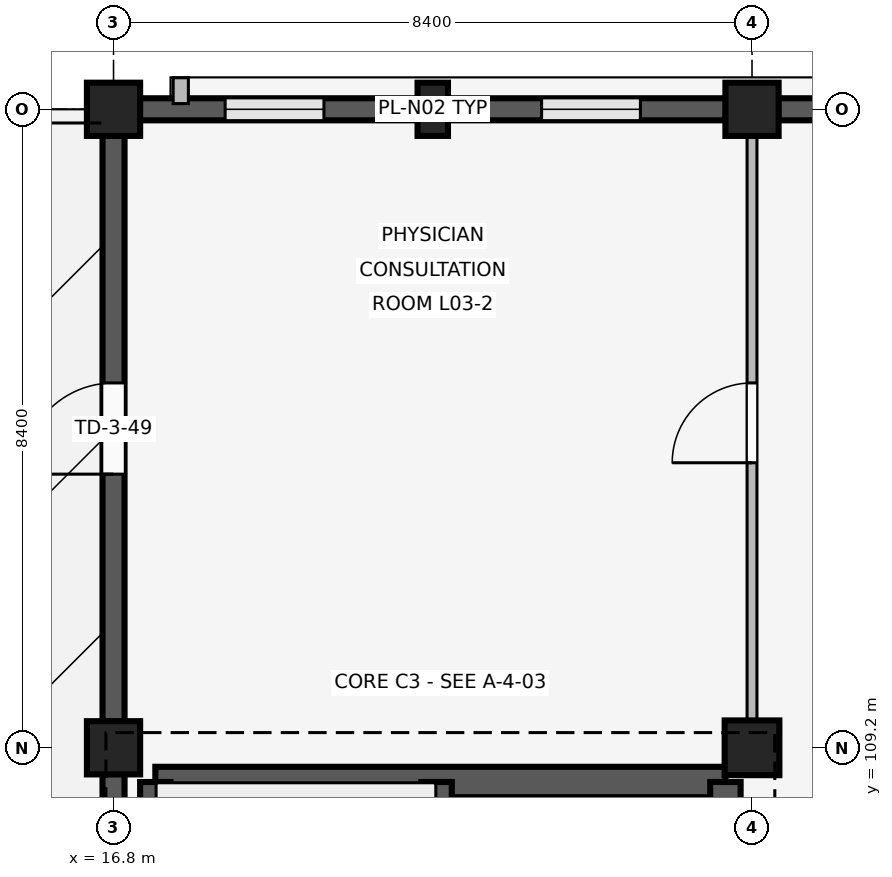
"""IFC4 building model, lengths in metres.
Left out: names, types, materials, properties, quantities, classifications, styles, units other than length and angle.
Written with IfcOpenShell. Run it as: python <this file> out.ifc"""

import sys

from ifc_helpers import new_model, si_unit, direction, frame, frame_2d, origin, origin_2d, place, context, subcontext, project, spatial, rectangle, extrude, element, fill, save


model = new_model("IFC4")
c1 = context("Model", 3, precision=1e-05, world=origin(), true_north=direction((0.0, 1.0)))
c2 = subcontext(c1, "Body", "Model", "MODEL_VIEW")
j1 = project(units=[si_unit("LENGTHUNIT", "METRE"), si_unit("PLANEANGLEUNIT", "RADIAN")], contexts=[c1])
p1 = place(None, origin())
s1 = spatial("IfcSite", under=j1, at=p1, CompositionType="ELEMENT")
p2 = place(p1, origin())
s2 = spatial("IfcBuilding", under=s1, at=p2, CompositionType="ELEMENT")
p3 = place(p2, frame((0.0, 0.0, 12.9)))
s3 = spatial("IfcBuildingStorey", under=s2, at=p3, CompositionType="ELEMENT", Elevation=12.9)
for number, where, z_axis, x_axis in (
    (1, (16.8, 109.2, 0.0), (0.0, 0.0, 1.0), (1.0, 0.0, 0.0)),
    (2, (16.8, 117.6, 0.0), (0.0, 0.0, 1.0), (1.0, 0.0, 0.0)),
):
    element("IfcColumn", number, at=place(p3, frame(where, z_axis=z_axis, x_axis=x_axis)), inside=s3, PredefinedType="COLUMN", context=c2, shape_type="SweptSolid", body=[
        extrude(rectangle(XDim=0.7, YDim=0.7, at=origin_2d()), origin(), (0.0, 0.0, 1.0), 3.3),
    ])
p4 = place(p3, frame((25.2, 109.2, 0.0), z_axis=(0.0, 0.0, 1.0), x_axis=(1.0, 0.0, 0.0)))
e3 = element("IfcColumn", 3, at=p4, inside=s3, PredefinedType="COLUMN", context=c2, shape_type="SweptSolid", body=[
    extrude(rectangle(XDim=0.72, YDim=0.72, at=origin_2d()), origin(), (0.0, 0.0, 1.0), 3.3),
])
p5 = place(p3, frame((25.2, 117.6, 0.0), z_axis=(0.0, 0.0, 1.0), x_axis=(1.0, 0.0, 0.0)))
e4 = element("IfcColumn", 4, at=p5, inside=s3, PredefinedType="COLUMN", context=c2, shape_type="SweptSolid", body=[
    extrude(rectangle(XDim=0.7, YDim=0.7, at=origin_2d()), origin(), (0.0, 0.0, 1.0), 3.3),
])
p6 = place(p3, frame((21.0, 117.6, 0.0), z_axis=(0.0, 0.0, 1.0), x_axis=(1.0, 0.0, 0.0)))
e5 = element("IfcColumn", 5, at=p6, inside=s3, PredefinedType="PILASTER", context=c2, shape_type="SweptSolid", body=[
    extrude(rectangle(XDim=0.4, YDim=0.7, at=origin_2d()), origin(), (0.0, 0.0, 1.0), 3.3),
])
p7 = place(p3, frame((16.8, 101.145, 0.0), z_axis=(0.0, 0.0, 1.0), x_axis=(0.0, 1.0, 0.0)))
e6 = element("IfcWall", 6, at=p7, inside=s3, PredefinedType="SOLIDWALL", context=c2, shape_type="SweptSolid", body=[
    extrude(rectangle(XDim=7.71, YDim=0.29, at=frame_2d((3.855, 0.0))), origin(), (0.0, 0.0, 1.0), 2.44),
])
p8 = place(p7, frame((1.1, 0.0, 1.05)))
e7 = element("IfcOpeningElement", 7, at=p8, cuts=e6, PredefinedType="OPENING", context=c2, shape_type="SweptSolid", body=[
    extrude(rectangle(XDim=1.5, YDim=0.75, at=frame_2d((0.75, 0.375))), frame((0.0, 0.155, 0.0), z_axis=(0.0, -1.0, 0.0), x_axis=(1.0, 0.0, 0.0)), (0.0, 0.0, 1.0), 0.31),
])
p9 = place(p7, frame((5.11, 0.0, 1.05)))
e8 = element("IfcOpeningElement", 8, at=p9, cuts=e6, PredefinedType="OPENING", context=c2, shape_type="SweptSolid", body=[
    extrude(rectangle(XDim=1.5, YDim=0.75, at=frame_2d((0.75, 0.375))), frame((0.0, 0.155, 0.0), z_axis=(0.0, -1.0, 0.0), x_axis=(1.0, 0.0, 0.0)), (0.0, 0.0, 1.0), 0.31),
])
p10 = place(p3, frame((17.145, 117.6, 0.0), z_axis=(0.0, 0.0, 1.0), x_axis=(1.0, 0.0, 0.0)))
e9 = element("IfcWall", 9, at=p10, inside=s3, PredefinedType="SOLIDWALL", context=c2, shape_type="SweptSolid", body=[
    extrude(rectangle(XDim=7.71, YDim=0.29, at=frame_2d((3.855, 0.0))), origin(), (0.0, 0.0, 1.0), 2.44),
])
p11 = place(p10, frame((1.123, 0.0, 1.05)))
e10 = element("IfcOpeningElement", 10, at=p11, cuts=e9, PredefinedType="OPENING", context=c2, shape_type="SweptSolid", body=[
    extrude(rectangle(XDim=1.3, YDim=0.75, at=frame_2d((0.65, 0.375))), frame((0.0, 0.155, 0.0), z_axis=(0.0, -1.0, 0.0), x_axis=(1.0, 0.0, 0.0)), (0.0, 0.0, 1.0), 0.31),
])
p12 = place(p10, frame((5.287, 0.0, 1.05)))
e11 = element("IfcOpeningElement", 11, at=p12, cuts=e9, PredefinedType="OPENING", context=c2, shape_type="SweptSolid", body=[
    extrude(rectangle(XDim=1.3, YDim=0.75, at=frame_2d((0.65, 0.375))), frame((0.0, 0.155, 0.0), z_axis=(0.0, -1.0, 0.0), x_axis=(1.0, 0.0, 0.0)), (0.0, 0.0, 1.0), 0.31),
])
p13 = place(p3, frame((17.685, 117.675, 0.0), z_axis=(0.0, 0.0, 1.0), x_axis=(0.0, 1.0, 0.0)))
e12 = element("IfcWall", 12, at=p13, inside=s3, PredefinedType="ELEMENTEDWALL", context=c2, shape_type="SweptSolid", body=[
    extrude(rectangle(XDim=0.34, YDim=0.2, at=frame_2d((0.17, 0.0))), origin(), (0.0, 0.0, 1.0), 2.42),
])
p14 = place(p3, frame((16.8, 109.545, 0.0), z_axis=(0.0, 0.0, 1.0), x_axis=(0.0, 1.0, 0.0)))
e13 = element("IfcWall", 13, at=p14, inside=s3, PredefinedType="SOLIDWALL", context=c2, shape_type="SweptSolid", body=[
    extrude(rectangle(XDim=7.71, YDim=0.29, at=frame_2d((3.855, 0.0))), origin(), (0.0, 0.0, 1.0), 2.44),
])
p15 = place(p14, frame((3.255, 0.0, 0.0)))
e14 = element("IfcOpeningElement", 14, at=p15, cuts=e13, PredefinedType="OPENING", context=c2, shape_type="SweptSolid", body=[
    extrude(rectangle(XDim=1.2, YDim=2.25, at=frame_2d((0.6, 1.125))), frame((0.0, 0.155, 0.0), z_axis=(0.0, -1.0, 0.0), x_axis=(1.0, 0.0, 0.0)), (0.0, 0.0, 1.0), 0.31),
])
p16 = place(p3, frame((25.545, 117.6, 0.0), z_axis=(0.0, 0.0, 1.0), x_axis=(1.0, 0.0, 0.0)))
e15 = element("IfcWall", 15, at=p16, inside=s3, PredefinedType="SOLIDWALL", context=c2, shape_type="SweptSolid", body=[
    extrude(rectangle(XDim=7.71, YDim=0.29, at=frame_2d((3.855, 0.0))), origin(), (0.0, 0.0, 1.0), 2.44),
])
p17 = place(p16, frame((1.1, 0.0, 1.05)))
e16 = element("IfcOpeningElement", 16, at=p17, cuts=e15, PredefinedType="OPENING", context=c2, shape_type="SweptSolid", body=[
    extrude(rectangle(XDim=1.5, YDim=0.75, at=frame_2d((0.75, 0.375))), frame((0.0, 0.155, 0.0), z_axis=(0.0, -1.0, 0.0), x_axis=(1.0, 0.0, 0.0)), (0.0, 0.0, 1.0), 0.31),
])
p18 = place(p16, frame((5.11, 0.0, 1.05)))
e17 = element("IfcOpeningElement", 17, at=p18, cuts=e15, PredefinedType="OPENING", context=c2, shape_type="SweptSolid", body=[
    extrude(rectangle(XDim=1.5, YDim=0.75, at=frame_2d((0.75, 0.375))), frame((0.0, 0.155, 0.0), z_axis=(0.0, -1.0, 0.0), x_axis=(1.0, 0.0, 0.0)), (0.0, 0.0, 1.0), 0.31),
])
p19 = place(p3, frame((17.35, 108.75, 0.0), z_axis=(0.0, 0.0, 1.0), x_axis=(1.0, 0.0, 0.0)))
e18 = element("IfcWall", 18, at=p19, inside=s3, PredefinedType="SHEAR", context=c2, shape_type="SweptSolid", body=[
    extrude(rectangle(XDim=7.5, YDim=0.4, at=frame_2d((3.75, 0.0))), origin(), (0.0, 0.0, 1.0), 3.02),
])
p20 = place(p3, frame((17.35, 101.2, 0.0), z_axis=(0.0, 0.0, 1.0), x_axis=(0.0, 1.0, 0.0)))
e19 = element("IfcWall", 19, at=p20, inside=s3, PredefinedType="SHEAR", context=c2, shape_type="SweptSolid", body=[
    extrude(rectangle(XDim=7.55, YDim=0.4, at=frame_2d((3.775, 0.0))), origin(), (0.0, 0.0, 1.0), 3.02),
])
p21 = place(p3, frame((24.85, 101.2, 0.0), z_axis=(0.0, 0.0, 1.0), x_axis=(0.0, 1.0, 0.0)))
e20 = element("IfcWall", 20, at=p21, inside=s3, PredefinedType="SHEAR", context=c2, shape_type="SweptSolid", body=[
    extrude(rectangle(XDim=7.55, YDim=0.4, at=frame_2d((3.775, 0.0))), origin(), (0.0, 0.0, 1.0), 3.02),
])
p22 = place(p21, frame((2.4, 0.0, 0.0)))
e21 = element("IfcOpeningElement", 21, at=p22, cuts=e20, PredefinedType="OPENING", context=c2, shape_type="SweptSolid", body=[
    extrude(rectangle(XDim=1.2, YDim=2.2, at=frame_2d((0.6, 1.1))), frame((0.0, 0.21, 0.0), z_axis=(0.0, -1.0, 0.0), x_axis=(1.0, 0.0, 0.0)), (0.0, 0.0, 1.0), 0.42),
])
p23 = place(p3, frame((21.05, 101.2, 0.0), z_axis=(0.0, 0.0, 1.0), x_axis=(0.0, 1.0, 0.0)))
e22 = element("IfcWall", 22, at=p23, inside=s3, PredefinedType="SHEAR", context=c2, shape_type="SweptSolid", body=[
    extrude(rectangle(XDim=7.55, YDim=0.4, at=frame_2d((3.775, 0.0))), origin(), (0.0, 0.0, 1.0), 3.02),
])
p24 = place(p23, frame((0.28, 0.0, 0.0)))
e23 = element("IfcOpeningElement", 23, at=p24, cuts=e22, PredefinedType="OPENING", context=c2, shape_type="SweptSolid", body=[
    extrude(rectangle(XDim=1.0, YDim=2.15, at=frame_2d((0.5, 1.075))), frame((0.0, 0.21, 0.0), z_axis=(0.0, -1.0, 0.0), x_axis=(1.0, 0.0, 0.0)), (0.0, 0.0, 1.0), 0.42),
])
p25 = place(p3, frame((25.2, 109.55, 0.0), z_axis=(0.0, 0.0, 1.0), x_axis=(0.0, 1.0, 0.0)))
e24 = element("IfcWall", 24, at=p25, inside=s3, PredefinedType="PARTITIONING", context=c2, shape_type="SweptSolid", body=[
    extrude(rectangle(XDim=7.91, YDim=0.13, at=frame_2d((3.955, 0.0))), origin(), (0.0, 0.0, 1.0), 2.42),
])
p26 = place(p25, frame((3.4, 0.0, 0.0)))
e25 = element("IfcOpeningElement", 25, at=p26, cuts=e24, PredefinedType="OPENING", context=c2, shape_type="SweptSolid", body=[
    extrude(rectangle(XDim=1.05, YDim=2.2, at=frame_2d((0.525, 1.1))), frame((0.0, 0.075, 0.0), z_axis=(0.0, -1.0, 0.0), x_axis=(1.0, 0.0, 0.0)), (0.0, 0.0, 1.0), 0.15),
])
p27 = place(p11, origin())
e26 = element("IfcWindow", 26, at=p27, inside=s3, PartitioningType="SINGLE_PANEL", PredefinedType="WINDOW", context=c2, shape_type="SweptSolid", body=[
    extrude(rectangle(XDim=1.3, YDim=0.75, at=frame_2d((0.65, 0.375))), frame((0.0, 0.03, 0.0), z_axis=(0.0, -1.0, 0.0), x_axis=(1.0, 0.0, 0.0)), (0.0, 0.0, 1.0), 0.06),
])
fill(e10, e26)
p28 = place(p12, origin())
e27 = element("IfcWindow", 27, at=p28, inside=s3, PartitioningType="SINGLE_PANEL", PredefinedType="WINDOW", context=c2, shape_type="SweptSolid", body=[
    extrude(rectangle(XDim=1.3, YDim=0.75, at=frame_2d((0.65, 0.375))), frame((0.0, 0.03, 0.0), z_axis=(0.0, -1.0, 0.0), x_axis=(1.0, 0.0, 0.0)), (0.0, 0.0, 1.0), 0.06),
])
fill(e11, e27)
p29 = place(p15, origin())
e28 = element("IfcDoor", 28, at=p29, inside=s3, OperationType="SINGLE_SWING_LEFT", PredefinedType="DOOR", context=c2, shape_type="SweptSolid", body=[
    extrude(rectangle(XDim=1.2, YDim=2.25, at=frame_2d((0.6, 1.125))), frame((0.0, 0.025, 0.0), z_axis=(0.0, -1.0, 0.0), x_axis=(1.0, 0.0, 0.0)), (0.0, 0.0, 1.0), 0.05),
])
fill(e14, e28)
p30 = place(p26, origin())
e29 = element("IfcDoor", 29, at=p30, inside=s3, OperationType="SINGLE_SWING_LEFT", PredefinedType="DOOR", context=c2, shape_type="SweptSolid", body=[
    extrude(rectangle(XDim=1.05, YDim=2.2, at=frame_2d((0.525, 1.1))), frame((0.0, 0.025, 0.0), z_axis=(0.0, -1.0, 0.0), x_axis=(1.0, 0.0, 0.0)), (0.0, 0.0, 1.0), 0.05),
])
fill(e25, e29)
save(model, sys.argv[1])
